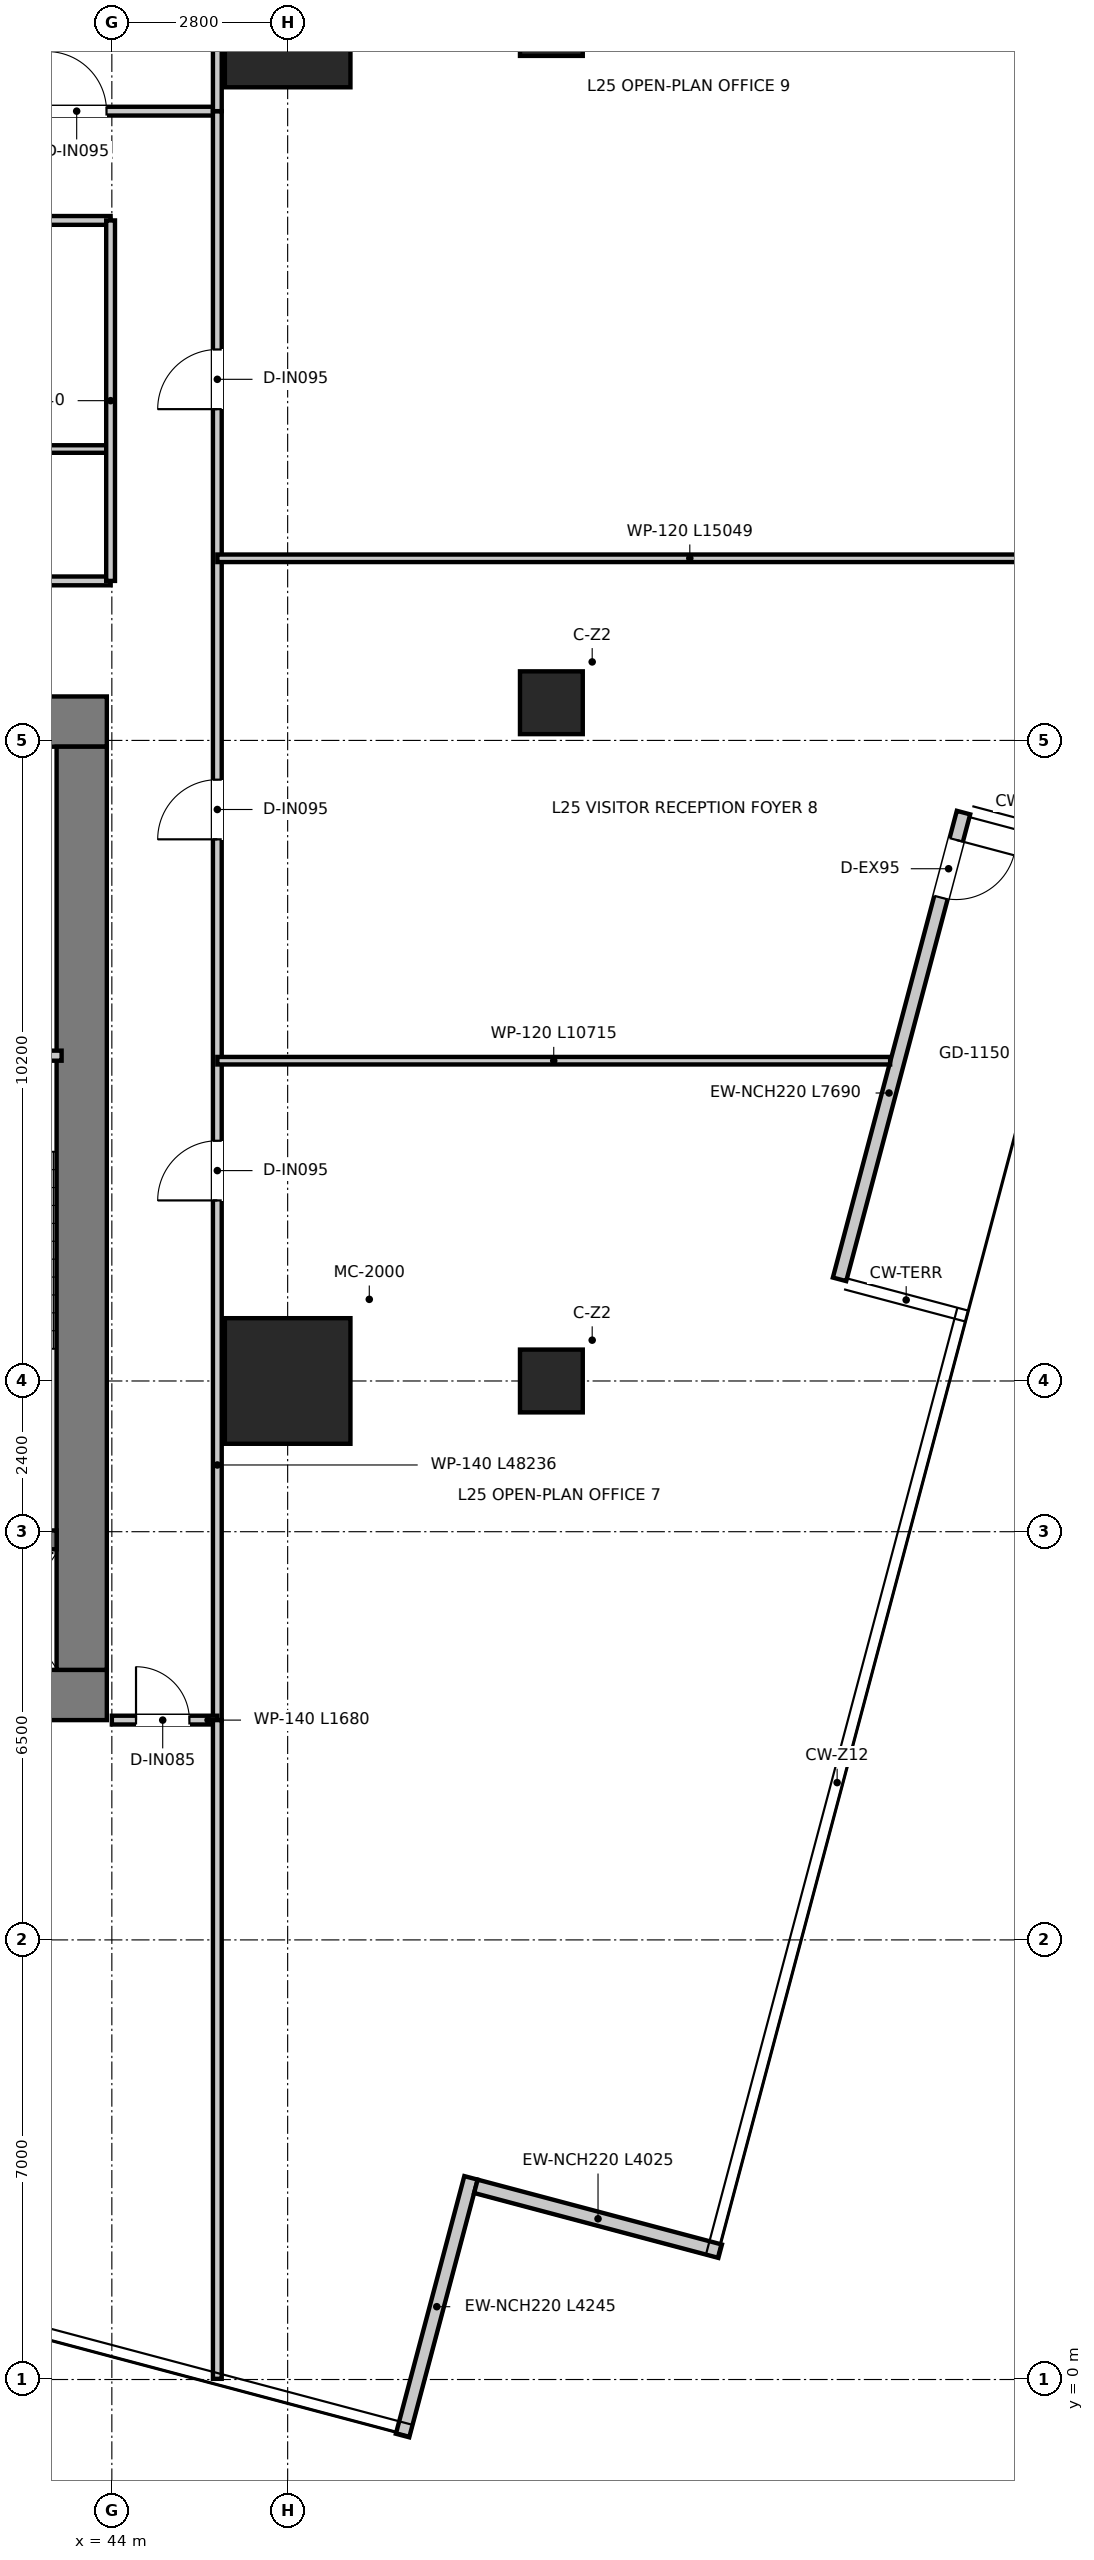
"""IFC4 building model, lengths in metres.
Left out: names, types, materials, properties, quantities, classifications, styles, units other than length and angle.
Written with IfcOpenShell. Run it as: python <this file> out.ifc"""

import sys

from ifc_helpers import new_model, si_unit, direction, frame, frame_2d, origin, origin_2d, place, context, subcontext, project, spatial, rectangle, extrude, source, transform, mapped, element, fill, save


model = new_model("IFC4")
c1 = context("Model", 3, precision=1e-05, world=origin(), true_north=direction((0.0, 1.0)))
c2 = subcontext(c1, "Body", "Model", "MODEL_VIEW")
j1 = project(units=[si_unit("LENGTHUNIT", "METRE"), si_unit("PLANEANGLEUNIT", "RADIAN")], contexts=[c1])
p1 = place(None, origin())
s1 = spatial("IfcSite", under=j1, at=p1, CompositionType="ELEMENT")
p2 = place(p1, origin())
s2 = spatial("IfcBuilding", under=s1, at=p2, CompositionType="ELEMENT")
p3 = place(p2, frame((0.0, 0.0, 105.85)))
s3 = spatial("IfcBuildingStorey", under=s2, at=p3, CompositionType="ELEMENT", Elevation=105.85)
p4 = place(p3, frame((28.08, 10.9, 0.0), z_axis=(0.0, 0.0, 1.0), x_axis=(1.0, 0.0, 0.0)))
e1 = element("IfcWall", 1, at=p4, inside=s3, PredefinedType="SHEAR", context=c2, shape_type="SweptSolid", body=[
    extrude(rectangle(XDim=15.84, YDim=0.8, at=frame_2d((7.92, 0.0))), origin(), (0.0, 0.0, 1.0), 3.95),
])
p5 = place(p3, frame((28.08, 26.4, 0.0), z_axis=(0.0, 0.0, 1.0), x_axis=(1.0, 0.0, 0.0)))
e2 = element("IfcWall", 2, at=p5, inside=s3, PredefinedType="SHEAR", context=c2, shape_type="SweptSolid", body=[
    extrude(rectangle(XDim=15.84, YDim=0.8, at=frame_2d((7.92, 0.0))), origin(), (0.0, 0.0, 1.0), 3.95),
])
p6 = place(p5, frame((7.22, 0.0, 0.0)))
e3 = element("IfcOpeningElement", 3, at=p6, cuts=e2, PredefinedType="OPENING", context=c2, shape_type="SweptSolid", body=[
    extrude(rectangle(XDim=1.4, YDim=2.2, at=frame_2d((0.7, 1.1))), frame((0.0, 0.41, 0.0), z_axis=(0.0, -1.0, 0.0), x_axis=(1.0, 0.0, 0.0)), (0.0, 0.0, 1.0), 0.82),
])
p7 = place(p5, frame((1.775, 0.0, 0.0)))
e4 = element("IfcOpeningElement", 4, at=p7, cuts=e2, PredefinedType="OPENING", context=c2, shape_type="SweptSolid", body=[
    extrude(rectangle(XDim=1.05, YDim=2.1, at=frame_2d((0.525, 1.05))), frame((0.0, 0.41, 0.0), z_axis=(0.0, -1.0, 0.0), x_axis=(1.0, 0.0, 0.0)), (0.0, 0.0, 1.0), 0.82),
])
p8 = place(p5, frame((13.015, 0.0, 0.0)))
e5 = element("IfcOpeningElement", 5, at=p8, cuts=e2, PredefinedType="OPENING", context=c2, shape_type="SweptSolid", body=[
    extrude(rectangle(XDim=1.05, YDim=2.1, at=frame_2d((0.525, 1.05))), frame((0.0, 0.41, 0.0), z_axis=(0.0, -1.0, 0.0), x_axis=(1.0, 0.0, 0.0)), (0.0, 0.0, 1.0), 0.82),
])
p9 = place(p3, frame((43.52, 11.3, 0.0), z_axis=(0.0, 0.0, 1.0), x_axis=(0.0, 1.0, 0.0)))
e6 = element("IfcWall", 6, at=p9, inside=s3, PredefinedType="SHEAR", context=c2, shape_type="SweptSolid", body=[
    extrude(rectangle(XDim=14.7, YDim=0.8, at=frame_2d((7.35, 0.0))), origin(), (0.0, 0.0, 1.0), 3.95),
])
p10 = place(p3, frame((40.02, 13.37, 0.0), z_axis=(0.0, 0.0, 1.0), x_axis=(1.0, 0.0, 0.0)))
e7 = element("IfcWall", 7, at=p10, inside=s3, PredefinedType="SHEAR", context=c2, shape_type="SweptSolid", body=[
    extrude(rectangle(XDim=3.1, YDim=0.3, at=frame_2d((1.55, 0.0))), origin(), (0.0, 0.0, 1.0), 3.95),
])
m1 = source(origin(), c2, "Body", "SweptSolid", [
    extrude(rectangle(XDim=2.0, YDim=2.0, at=origin_2d()), origin(), (0.0, 0.0, 1.0), 3.95),
])
for number, where, z_axis, x_axis in (
    (8, (46.8, 15.9, 0.0), (0.0, 0.0, 1.0), (1.0, 0.0, 0.0)),
    (9, (46.8, 37.5, 0.0), (0.0, 0.0, 1.0), (1.0, 0.0, 0.0)),
):
    element("IfcColumn", number, at=place(p3, frame(where, z_axis=z_axis, x_axis=x_axis)), inside=s3, PredefinedType="USERDEFINED", context=c2, shape_type="MappedRepresentation", body=[
        mapped(m1, transform((0.0, 0.0, 0.0), x_axis=(1.0, 0.0, 0.0), y_axis=(0.0, 1.0, 0.0), z_axis=(0.0, 0.0, 1.0), scale=1.0)),
    ])
m2 = source(origin(), c2, "Body", "SweptSolid", [
    extrude(rectangle(XDim=1.0, YDim=1.0, at=origin_2d()), origin(), (0.0, 0.0, 1.0), 3.95),
])
for number, where, z_axis, x_axis in (
    (10, (51.0, 37.5, 0.0), (0.0, 0.0, 1.0), (1.0, 0.0, 0.0)),
    (11, (51.0, 26.7, 0.0), (0.0, 0.0, 1.0), (1.0, 0.0, 0.0)),
    (12, (51.0, 15.9, 0.0), (0.0, 0.0, 1.0), (1.0, 0.0, 0.0)),
):
    element("IfcColumn", number, at=place(p3, frame(where, z_axis=z_axis, x_axis=x_axis)), inside=s3, PredefinedType="COLUMN", context=c2, shape_type="MappedRepresentation", body=[
        mapped(m2, transform((0.0, 0.0, 0.0), x_axis=(1.0, 0.0, 0.0), y_axis=(0.0, 1.0, 0.0), z_axis=(0.0, 0.0, 1.0), scale=1.0)),
    ])
p11 = place(p3, frame((48.63, -0.892, 0.0), z_axis=(0.0, 0.0, 1.0), x_axis=(0.256692391399, 0.966493153725, 0.0)))
e13 = element("IfcWall", 13, at=p11, inside=s3, PredefinedType="ELEMENTEDWALL", context=c2, shape_type="SweptSolid", body=[
    extrude(rectangle(XDim=4.245, YDim=0.22, at=frame_2d((2.123, 0.0))), origin(), (0.0, 0.0, 1.0), 3.67),
])
p12 = place(p3, frame((49.798, 3.076, 0.0), z_axis=(0.0, 0.0, 1.0), x_axis=(0.966492181189, -0.256696053144, 0.0)))
e14 = element("IfcWall", 14, at=p12, inside=s3, PredefinedType="ELEMENTEDWALL", context=c2, shape_type="SweptSolid", body=[
    extrude(rectangle(XDim=4.025, YDim=0.22, at=frame_2d((2.012, 0.0))), origin(), (0.0, 0.0, 1.0), 3.67),
])
p13 = place(p3, frame((57.563, 24.951, 0.0), z_axis=(0.0, 0.0, 1.0), x_axis=(-0.256717978083, -0.966486357756, 0.0)))
e15 = element("IfcWall", 15, at=p13, inside=s3, PredefinedType="ELEMENTEDWALL", context=c2, shape_type="SweptSolid", body=[
    extrude(rectangle(XDim=7.69, YDim=0.22, at=frame_2d((3.845, 0.0))), origin(), (0.0, 0.0, 1.0), 3.67),
])
p14 = place(p13, frame((0.45, 0.0, 0.0)))
e16 = element("IfcOpeningElement", 16, at=p14, cuts=e15, PredefinedType="OPENING", context=c2, shape_type="SweptSolid", body=[
    extrude(rectangle(XDim=0.95, YDim=2.1, at=frame_2d((0.475, 1.05))), frame((0.0, 0.12, 0.0), z_axis=(0.0, -1.0, 0.0), x_axis=(1.0, 0.0, 0.0)), (0.0, 0.0, 1.0), 0.24),
])
p15 = place(p3, frame((40.04, 21.08, 0.0), z_axis=(0.0, 0.0, 1.0), x_axis=(1.0, 0.0, 0.0)))
e17 = element("IfcWall", 17, at=p15, inside=s3, PredefinedType="PARTITIONING", context=c2, shape_type="SweptSolid", body=[
    extrude(rectangle(XDim=3.16, YDim=0.16, at=frame_2d((1.58, 0.0))), origin(), (0.0, 0.0, 1.0), 3.67),
])
p16 = place(p15, frame((1.055, 0.0, 0.0)))
e18 = element("IfcOpeningElement", 18, at=p16, cuts=e17, PredefinedType="OPENING", context=c2, shape_type="SweptSolid", body=[
    extrude(rectangle(XDim=1.05, YDim=2.1, at=frame_2d((0.525, 1.05))), frame((0.0, 0.09, 0.0), z_axis=(0.0, -1.0, 0.0), x_axis=(1.0, 0.0, 0.0)), (0.0, 0.0, 1.0), 0.18),
])
p17 = place(p3, frame((28.02, 28.64, 0.0), z_axis=(0.0, 0.0, 1.0), x_axis=(1.0, 0.0, 0.0)))
e19 = element("IfcWall", 19, at=p17, inside=s3, PredefinedType="PARTITIONING", context=c2, shape_type="SweptSolid", body=[
    extrude(rectangle(XDim=15.96, YDim=0.14, at=frame_2d((7.98, 0.0))), origin(), (0.0, 0.0, 1.0), 3.08),
])
p18 = place(p17, frame((7.455, 0.0, 0.0)))
e20 = element("IfcOpeningElement", 20, at=p18, cuts=e19, PredefinedType="OPENING", context=c2, shape_type="SweptSolid", body=[
    extrude(rectangle(XDim=1.05, YDim=2.15, at=frame_2d((0.525, 1.075))), frame((0.0, 0.08, 0.0), z_axis=(0.0, -1.0, 0.0), x_axis=(1.0, 0.0, 0.0)), (0.0, 0.0, 1.0), 0.16),
])
p19 = place(p3, frame((28.02, 30.74, 0.0), z_axis=(0.0, 0.0, 1.0), x_axis=(1.0, 0.0, 0.0)))
e21 = element("IfcWall", 21, at=p19, inside=s3, PredefinedType="PARTITIONING", context=c2, shape_type="SweptSolid", body=[
    extrude(rectangle(XDim=15.96, YDim=0.12, at=frame_2d((7.98, 0.0))), origin(), (0.0, 0.0, 1.0), 3.08),
])
p20 = place(p3, frame((28.02, 34.38, 0.0), z_axis=(0.0, 0.0, 1.0), x_axis=(1.0, 0.0, 0.0)))
e22 = element("IfcWall", 22, at=p20, inside=s3, PredefinedType="PARTITIONING", context=c2, shape_type="SweptSolid", body=[
    extrude(rectangle(XDim=15.96, YDim=0.14, at=frame_2d((7.98, 0.0))), origin(), (0.0, 0.0, 1.0), 3.08),
])
p21 = place(p20, frame((1.13, 0.0, 0.0)))
e23 = element("IfcOpeningElement", 23, at=p21, cuts=e22, PredefinedType="OPENING", context=c2, shape_type="SweptSolid", body=[
    extrude(rectangle(XDim=0.9, YDim=2.1, at=frame_2d((0.45, 1.05))), frame((0.0, 0.08, 0.0), z_axis=(0.0, -1.0, 0.0), x_axis=(1.0, 0.0, 0.0)), (0.0, 0.0, 1.0), 0.16),
])
p22 = place(p20, frame((4.33, 0.0, 0.0)))
e24 = element("IfcOpeningElement", 24, at=p22, cuts=e22, PredefinedType="OPENING", context=c2, shape_type="SweptSolid", body=[
    extrude(rectangle(XDim=0.9, YDim=2.1, at=frame_2d((0.45, 1.05))), frame((0.0, 0.08, 0.0), z_axis=(0.0, -1.0, 0.0), x_axis=(1.0, 0.0, 0.0)), (0.0, 0.0, 1.0), 0.16),
])
p23 = place(p20, frame((7.355, 0.0, 0.0)))
e25 = element("IfcOpeningElement", 25, at=p23, cuts=e22, PredefinedType="OPENING", context=c2, shape_type="SweptSolid", body=[
    extrude(rectangle(XDim=0.95, YDim=2.1, at=frame_2d((0.475, 1.05))), frame((0.0, 0.08, 0.0), z_axis=(0.0, -1.0, 0.0), x_axis=(1.0, 0.0, 0.0)), (0.0, 0.0, 1.0), 0.16),
])
p24 = place(p20, frame((12.23, 0.0, 0.0)))
e26 = element("IfcOpeningElement", 26, at=p24, cuts=e22, PredefinedType="OPENING", context=c2, shape_type="SweptSolid", body=[
    extrude(rectangle(XDim=0.95, YDim=2.1, at=frame_2d((0.475, 1.05))), frame((0.0, 0.08, 0.0), z_axis=(0.0, -1.0, 0.0), x_axis=(1.0, 0.0, 0.0)), (0.0, 0.0, 1.0), 0.16),
])
p25 = place(p3, frame((43.98, 28.64, 0.0), z_axis=(0.0, 0.0, 1.0), x_axis=(0.0, 1.0, 0.0)))
e27 = element("IfcWall", 27, at=p25, inside=s3, PredefinedType="PARTITIONING", context=c2, shape_type="SweptSolid", body=[
    extrude(rectangle(XDim=5.74, YDim=0.14, at=frame_2d((2.87, 0.0))), origin(), (0.0, 0.0, 1.0), 3.27),
])
p26 = place(p3, frame((26.32, 36.12, 0.0), z_axis=(0.0, 0.0, 1.0), x_axis=(1.0, 0.0, 0.0)))
e28 = element("IfcWall", 28, at=p26, inside=s3, PredefinedType="PARTITIONING", context=c2, shape_type="SweptSolid", body=[
    extrude(rectangle(XDim=19.36, YDim=0.14, at=frame_2d((9.68, 0.0))), origin(), (0.0, 0.0, 1.0), 3.08),
])
p27 = place(p26, frame((1.265, 0.0, 0.0)))
e29 = element("IfcOpeningElement", 29, at=p27, cuts=e28, PredefinedType="OPENING", context=c2, shape_type="SweptSolid", body=[
    extrude(rectangle(XDim=0.95, YDim=2.1, at=frame_2d((0.475, 1.05))), frame((0.0, 0.08, 0.0), z_axis=(0.0, -1.0, 0.0), x_axis=(1.0, 0.0, 0.0)), (0.0, 0.0, 1.0), 0.16),
])
p28 = place(p26, frame((5.855, 0.0, 0.0)))
e30 = element("IfcOpeningElement", 30, at=p28, cuts=e28, PredefinedType="OPENING", context=c2, shape_type="SweptSolid", body=[
    extrude(rectangle(XDim=0.95, YDim=2.1, at=frame_2d((0.475, 1.05))), frame((0.0, 0.08, 0.0), z_axis=(0.0, -1.0, 0.0), x_axis=(1.0, 0.0, 0.0)), (0.0, 0.0, 1.0), 0.16),
])
p29 = place(p26, frame((11.555, 0.0, 0.0)))
e31 = element("IfcOpeningElement", 31, at=p29, cuts=e28, PredefinedType="OPENING", context=c2, shape_type="SweptSolid", body=[
    extrude(rectangle(XDim=0.95, YDim=2.1, at=frame_2d((0.475, 1.05))), frame((0.0, 0.08, 0.0), z_axis=(0.0, -1.0, 0.0), x_axis=(1.0, 0.0, 0.0)), (0.0, 0.0, 1.0), 0.16),
])
p30 = place(p26, frame((16.645, 0.0, 0.0)))
e32 = element("IfcOpeningElement", 32, at=p30, cuts=e28, PredefinedType="OPENING", context=c2, shape_type="SweptSolid", body=[
    extrude(rectangle(XDim=0.95, YDim=2.1, at=frame_2d((0.475, 1.05))), frame((0.0, 0.08, 0.0), z_axis=(0.0, -1.0, 0.0), x_axis=(1.0, 0.0, 0.0)), (0.0, 0.0, 1.0), 0.16),
])
p31 = place(p3, frame((45.68, 10.5, 0.0), z_axis=(0.0, 0.0, 1.0), x_axis=(0.0, 1.0, 0.0)))
e33 = element("IfcWall", 33, at=p31, inside=s3, PredefinedType="PARTITIONING", context=c2, shape_type="SweptSolid", body=[
    extrude(rectangle(XDim=25.62, YDim=0.14, at=frame_2d((12.81, 0.0))), origin(), (0.0, 0.0, 1.0), 2.97),
])
p32 = place(p31, frame((8.275, 0.0, 0.0)))
e34 = element("IfcOpeningElement", 34, at=p32, cuts=e33, PredefinedType="OPENING", context=c2, shape_type="SweptSolid", body=[
    extrude(rectangle(XDim=0.95, YDim=2.1, at=frame_2d((0.475, 1.05))), frame((0.0, 0.08, 0.0), z_axis=(0.0, -1.0, 0.0), x_axis=(1.0, 0.0, 0.0)), (0.0, 0.0, 1.0), 0.16),
])
p33 = place(p31, frame((14.025, 0.0, 0.0)))
e35 = element("IfcOpeningElement", 35, at=p33, cuts=e33, PredefinedType="OPENING", context=c2, shape_type="SweptSolid", body=[
    extrude(rectangle(XDim=0.95, YDim=2.1, at=frame_2d((0.475, 1.05))), frame((0.0, 0.08, 0.0), z_axis=(0.0, -1.0, 0.0), x_axis=(1.0, 0.0, 0.0)), (0.0, 0.0, 1.0), 0.16),
])
p34 = place(p31, frame((20.875, 0.0, 0.0)))
e36 = element("IfcOpeningElement", 36, at=p34, cuts=e33, PredefinedType="OPENING", context=c2, shape_type="SweptSolid", body=[
    extrude(rectangle(XDim=0.95, YDim=2.1, at=frame_2d((0.475, 1.05))), frame((0.0, 0.08, 0.0), z_axis=(0.0, -1.0, 0.0), x_axis=(1.0, 0.0, 0.0)), (0.0, 0.0, 1.0), 0.16),
])
p35 = place(p3, frame((44.0, 10.5, 0.0), z_axis=(0.0, 0.0, 1.0), x_axis=(1.0, 0.0, 0.0)))
e37 = element("IfcWall", 37, at=p35, inside=s3, PredefinedType="PARTITIONING", context=c2, shape_type="SweptSolid", body=[
    extrude(rectangle(XDim=1.68, YDim=0.14, at=frame_2d((0.84, 0.0))), origin(), (0.0, 0.0, 1.0), 3.67),
])
p36 = place(p35, frame((0.385, 0.0, 0.0)))
e38 = element("IfcOpeningElement", 38, at=p36, cuts=e37, PredefinedType="OPENING", context=c2, shape_type="SweptSolid", body=[
    extrude(rectangle(XDim=0.85, YDim=2.1, at=frame_2d((0.425, 1.05))), frame((0.0, 0.08, 0.0), z_axis=(0.0, -1.0, 0.0), x_axis=(1.0, 0.0, 0.0)), (0.0, 0.0, 1.0), 0.16),
])
p37 = place(p3, frame((45.68, 36.12, 0.0), z_axis=(0.0, 0.0, 1.0), x_axis=(0.0, 1.0, 0.0)))
e39 = element("IfcWall", 39, at=p37, inside=s3, PredefinedType="PARTITIONING", context=c2, shape_type="SweptSolid", body=[
    extrude(rectangle(XDim=12.127, YDim=0.14, at=frame_2d((6.063, 0.0))), origin(), (0.0, 0.0, 1.0), 2.97),
])
p38 = place(p3, frame((45.68, 0.01, 0.0), z_axis=(0.0, 0.0, 1.0), x_axis=(0.0, 1.0, 0.0)))
e40 = element("IfcWall", 40, at=p38, inside=s3, PredefinedType="PARTITIONING", context=c2, shape_type="SweptSolid", body=[
    extrude(rectangle(XDim=10.49, YDim=0.14, at=frame_2d((5.245, 0.0))), origin(), (0.0, 0.0, 1.0), 3.67),
])
p39 = place(p3, frame((45.68, 21.0, 0.0), z_axis=(0.0, 0.0, 1.0), x_axis=(1.0, 0.0, 0.0)))
e41 = element("IfcWall", 41, at=p39, inside=s3, PredefinedType="PARTITIONING", context=c2, shape_type="SweptSolid", body=[
    extrude(rectangle(XDim=10.715, YDim=0.12, at=frame_2d((5.358, 0.0))), origin(), (0.0, 0.0, 1.0), 2.97),
])
p40 = place(p3, frame((45.68, 29.0, 0.0), z_axis=(0.0, 0.0, 1.0), x_axis=(1.0, 0.0, 0.0)))
e42 = element("IfcWall", 42, at=p40, inside=s3, PredefinedType="PARTITIONING", context=c2, shape_type="SweptSolid", body=[
    extrude(rectangle(XDim=15.049, YDim=0.12, at=frame_2d((7.525, 0.0))), origin(), (0.0, 0.0, 1.0), 2.97),
])
p41 = place(p30, origin())
e43 = element("IfcDoor", 43, at=p41, inside=s3, OperationType="SINGLE_SWING_LEFT", PredefinedType="DOOR", context=c2, shape_type="SweptSolid", body=[
    extrude(rectangle(XDim=0.95, YDim=2.1, at=frame_2d((0.475, 1.05))), frame((0.0, 0.025, 0.0), z_axis=(0.0, -1.0, 0.0), x_axis=(1.0, 0.0, 0.0)), (0.0, 0.0, 1.0), 0.05),
])
fill(e32, e43)
p42 = place(p32, origin())
e44 = element("IfcDoor", 44, at=p42, inside=s3, OperationType="SINGLE_SWING_LEFT", PredefinedType="DOOR", context=c2, shape_type="SweptSolid", body=[
    extrude(rectangle(XDim=0.95, YDim=2.1, at=frame_2d((0.475, 1.05))), frame((0.0, 0.025, 0.0), z_axis=(0.0, -1.0, 0.0), x_axis=(1.0, 0.0, 0.0)), (0.0, 0.0, 1.0), 0.05),
])
fill(e34, e44)
p43 = place(p33, origin())
e45 = element("IfcDoor", 45, at=p43, inside=s3, OperationType="SINGLE_SWING_LEFT", PredefinedType="DOOR", context=c2, shape_type="SweptSolid", body=[
    extrude(rectangle(XDim=0.95, YDim=2.1, at=frame_2d((0.475, 1.05))), frame((0.0, 0.025, 0.0), z_axis=(0.0, -1.0, 0.0), x_axis=(1.0, 0.0, 0.0)), (0.0, 0.0, 1.0), 0.05),
])
fill(e35, e45)
p44 = place(p34, origin())
e46 = element("IfcDoor", 46, at=p44, inside=s3, OperationType="SINGLE_SWING_LEFT", PredefinedType="DOOR", context=c2, shape_type="SweptSolid", body=[
    extrude(rectangle(XDim=0.95, YDim=2.1, at=frame_2d((0.475, 1.05))), frame((0.0, 0.025, 0.0), z_axis=(0.0, -1.0, 0.0), x_axis=(1.0, 0.0, 0.0)), (0.0, 0.0, 1.0), 0.05),
])
fill(e36, e46)
p45 = place(p36, origin())
e47 = element("IfcDoor", 47, at=p45, inside=s3, OperationType="SINGLE_SWING_LEFT", PredefinedType="DOOR", context=c2, shape_type="SweptSolid", body=[
    extrude(rectangle(XDim=0.85, YDim=2.1, at=frame_2d((0.425, 1.05))), frame((0.0, 0.025, 0.0), z_axis=(0.0, -1.0, 0.0), x_axis=(1.0, 0.0, 0.0)), (0.0, 0.0, 1.0), 0.05),
])
fill(e38, e47)
p46 = place(p14, origin())
e48 = element("IfcDoor", 48, at=p46, inside=s3, OperationType="SINGLE_SWING_LEFT", PredefinedType="DOOR", context=c2, shape_type="SweptSolid", body=[
    extrude(rectangle(XDim=0.95, YDim=2.1, at=frame_2d((0.475, 1.05))), frame((0.0, 0.025, 0.0), z_axis=(0.0, -1.0, 0.0), x_axis=(1.0, 0.0, 0.0)), (0.0, 0.0, 1.0), 0.05),
])
fill(e16, e48)
save(model, sys.argv[1])
